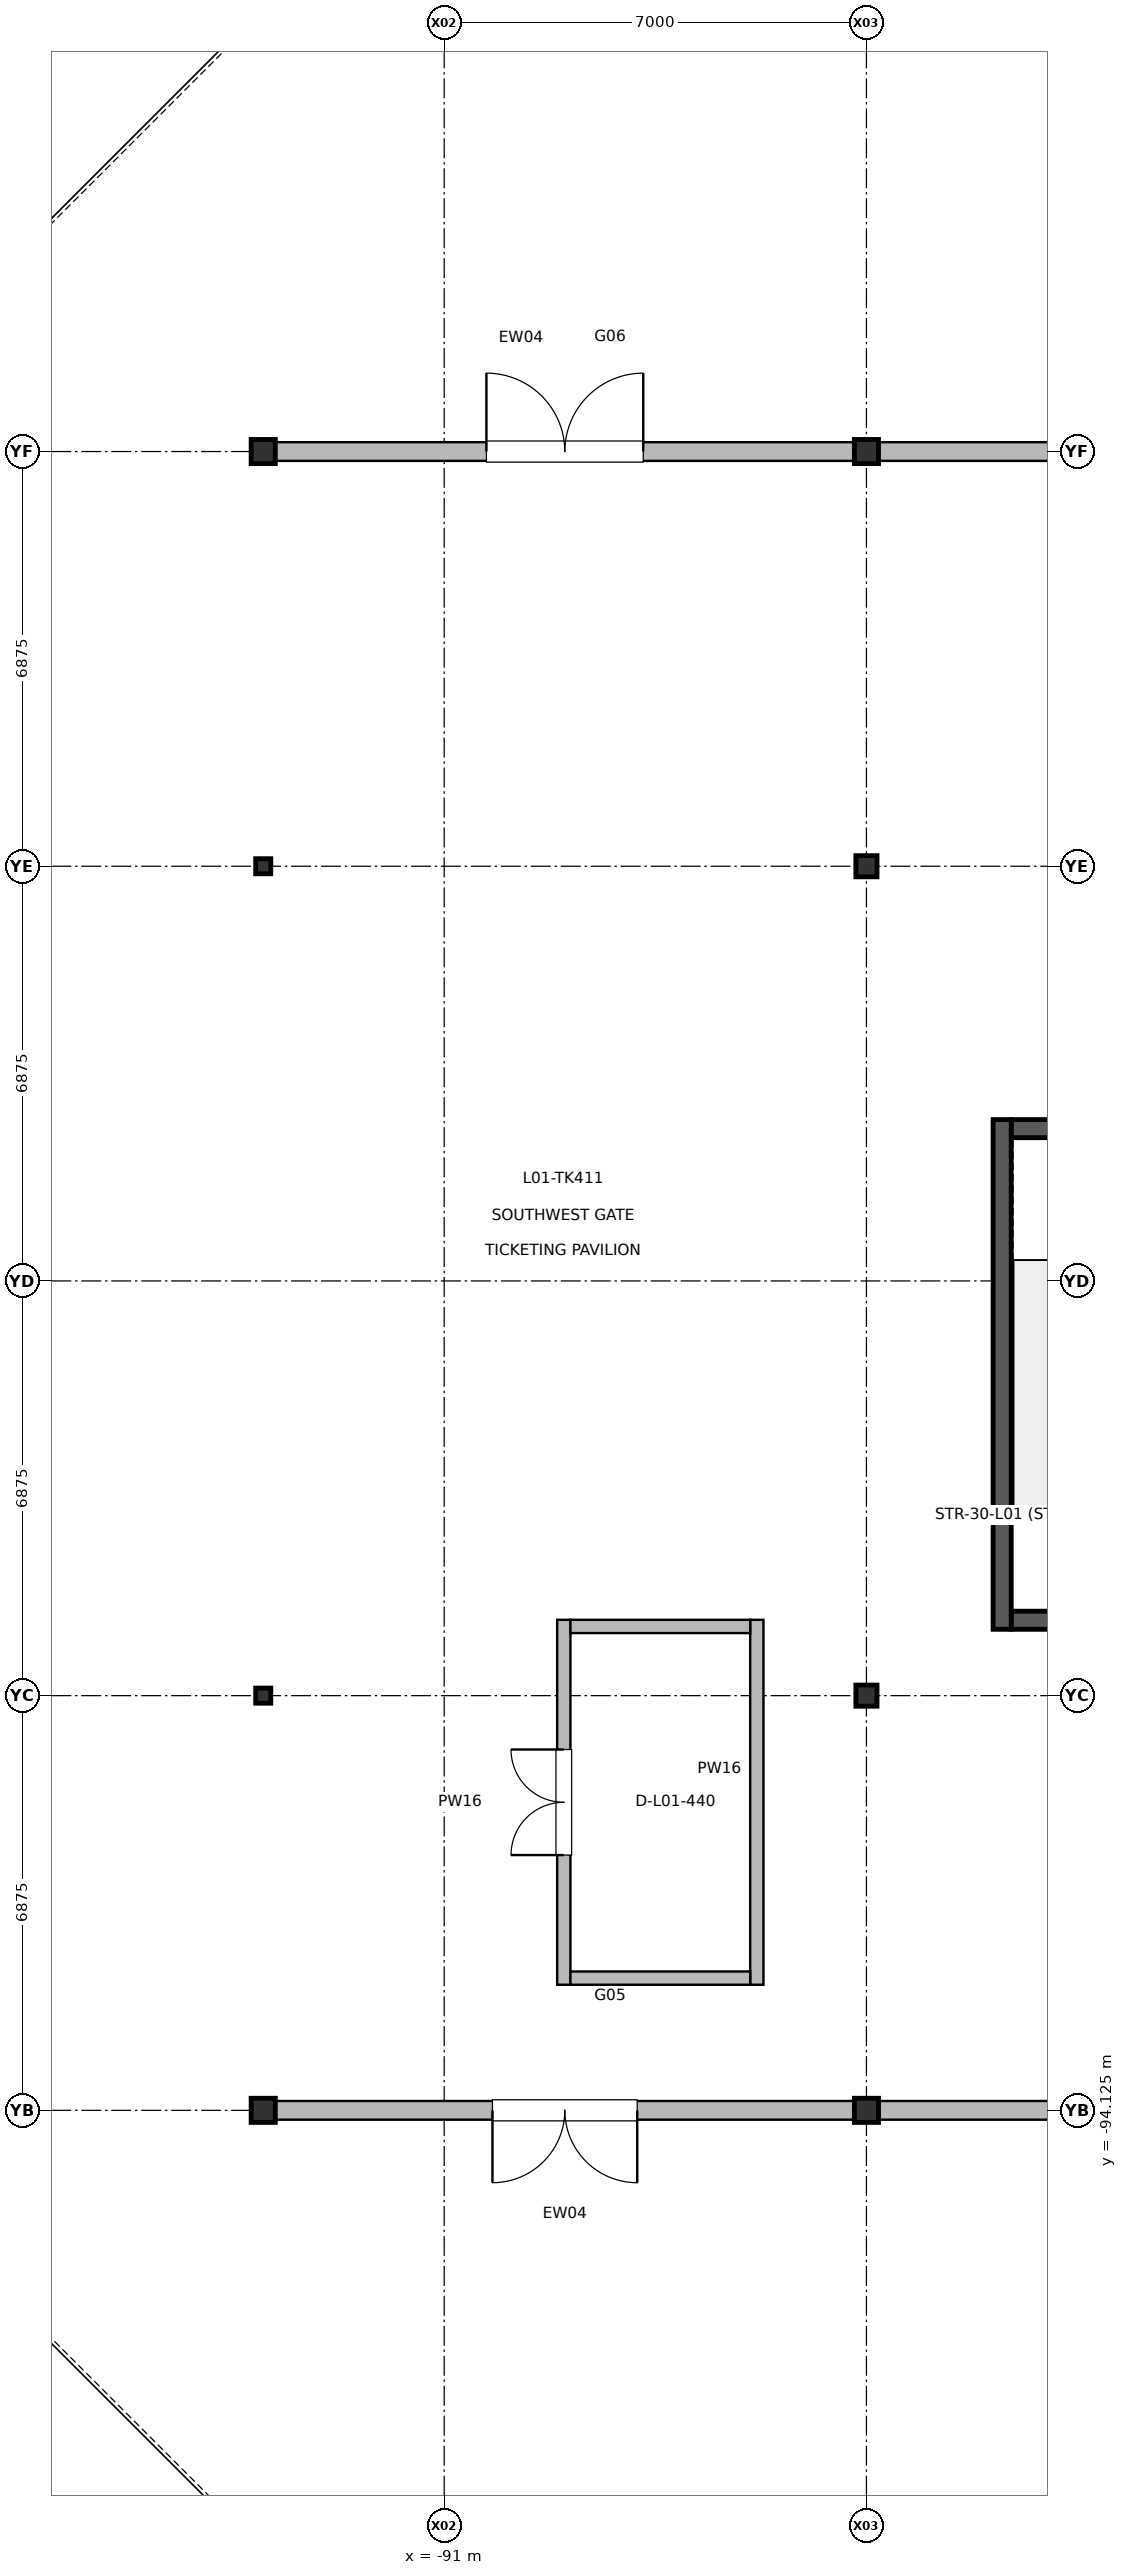
"""IFC4 building model, lengths in metres.
Left out: names, types, materials, properties, quantities, classifications, styles, units other than length and angle.
Written with IfcOpenShell. Run it as: python <this file> out.ifc"""

import sys

from ifc_helpers import new_model, si_unit, direction, frame, frame_2d, origin, origin_2d, place, context, subcontext, project, spatial, rectangle, i_section, extrude, element, fill, save


model = new_model("IFC4")
c1 = context("Model", 3, precision=1e-05, world=origin(), true_north=direction((0.0, 1.0)))
c2 = subcontext(c1, "Body", "Model", "MODEL_VIEW")
j1 = project(units=[si_unit("LENGTHUNIT", "METRE"), si_unit("PLANEANGLEUNIT", "RADIAN")], contexts=[c1])
p1 = place(None, origin())
s1 = spatial("IfcSite", under=j1, at=p1, CompositionType="ELEMENT")
p2 = place(p1, origin())
s2 = spatial("IfcBuilding", under=s1, at=p2, CompositionType="ELEMENT")
p3 = place(p2, origin())
s3 = spatial("IfcBuildingStorey", under=s2, at=p3, CompositionType="ELEMENT", Elevation=0.0)
p4 = place(p3, frame((-94.0, -94.125, 0.0), z_axis=(0.0, 0.0, 1.0), x_axis=(1.0, 0.0, 0.0)))
e1 = element("IfcColumn", 1, at=p4, inside=s3, PredefinedType="COLUMN", context=c2, shape_type="SweptSolid", body=[
    extrude(i_section(OverallWidth=0.4, OverallDepth=0.4, WebThickness=0.013, FlangeThickness=0.021, at=origin_2d()), origin(), (0.0, 0.0, 1.0), 5.998),
])
for number, where, z_axis, x_axis in (
    (2, (-94.0, -87.25, 0.0), (0.0, 0.0, 1.0), (1.0, 0.0, 0.0)),
    (3, (-94.0, -73.5, 0.0), (0.0, 0.0, 1.0), (1.0, 0.0, 0.0)),
):
    element("IfcColumn", number, at=place(p3, frame(where, z_axis=z_axis, x_axis=x_axis)), inside=s3, PredefinedType="COLUMN", context=c2, shape_type="SweptSolid", body=[
        extrude(i_section(OverallWidth=0.25, OverallDepth=0.25, WebThickness=0.009, FlangeThickness=0.014, at=origin_2d()), origin(), (0.0, 0.0, 1.0), 5.998),
    ])
for number, where, z_axis, x_axis in (
    (4, (-94.0, -66.625, 0.0), (0.0, 0.0, 1.0), (1.0, 0.0, 0.0)),
    (5, (-84.0, -94.125, 0.0), (0.0, 0.0, 1.0), (1.0, 0.0, 0.0)),
):
    element("IfcColumn", number, at=place(p3, frame(where, z_axis=z_axis, x_axis=x_axis)), inside=s3, PredefinedType="COLUMN", context=c2, shape_type="SweptSolid", body=[
        extrude(i_section(OverallWidth=0.4, OverallDepth=0.4, WebThickness=0.013, FlangeThickness=0.021, at=origin_2d()), origin(), (0.0, 0.0, 1.0), 5.998),
    ])
for number, where, z_axis, x_axis in (
    (6, (-84.0, -87.25, 0.0), (0.0, 0.0, 1.0), (1.0, 0.0, 0.0)),
    (7, (-84.0, -73.5, 0.0), (0.0, 0.0, 1.0), (1.0, 0.0, 0.0)),
):
    element("IfcColumn", number, at=place(p3, frame(where, z_axis=z_axis, x_axis=x_axis)), inside=s3, PredefinedType="COLUMN", context=c2, shape_type="SweptSolid", body=[
        extrude(i_section(OverallWidth=0.35, OverallDepth=0.35, WebThickness=0.012, FlangeThickness=0.019, at=origin_2d()), origin(), (0.0, 0.0, 1.0), 5.998),
    ])
p5 = place(p3, frame((-84.0, -66.625, 0.0), z_axis=(0.0, 0.0, 1.0), x_axis=(1.0, 0.0, 0.0)))
e8 = element("IfcColumn", 8, at=p5, inside=s3, PredefinedType="COLUMN", context=c2, shape_type="SweptSolid", body=[
    extrude(i_section(OverallWidth=0.4, OverallDepth=0.4, WebThickness=0.013, FlangeThickness=0.021, at=origin_2d()), origin(), (0.0, 0.0, 1.0), 5.998),
])
p6 = place(p3, frame((-84.19, -94.125, 0.0), z_axis=(0.0, 0.0, 1.0), x_axis=(-1.0, 0.0, 0.0)))
e9 = element("IfcWall", 9, at=p6, inside=s3, PredefinedType="SOLIDWALL", context=c2, shape_type="SweptSolid", body=[
    extrude(rectangle(XDim=9.62, YDim=0.31, at=frame_2d((4.81, 0.0))), origin(), (0.0, 0.0, 1.0), 4.675),
])
p7 = place(p6, frame((3.61, 0.0, 0.0)))
e10 = element("IfcOpeningElement", 10, at=p7, cuts=e9, PredefinedType="OPENING", context=c2, shape_type="SweptSolid", body=[
    extrude(rectangle(XDim=2.4, YDim=2.5, at=frame_2d((1.2, 1.25))), frame((0.0, 0.165, 0.0), z_axis=(0.0, -1.0, 0.0), x_axis=(1.0, 0.0, 0.0)), (0.0, 0.0, 1.0), 0.33),
])
p8 = place(p3, frame((-93.81, -66.625, 0.0), z_axis=(0.0, 0.0, 1.0), x_axis=(1.0, 0.0, 0.0)))
e11 = element("IfcWall", 11, at=p8, inside=s3, PredefinedType="SOLIDWALL", context=c2, shape_type="SweptSolid", body=[
    extrude(rectangle(XDim=9.62, YDim=0.31, at=frame_2d((4.81, 0.0))), origin(), (0.0, 0.0, 1.0), 4.575),
])
p9 = place(p8, frame((3.51, 0.0, 0.0)))
e12 = element("IfcOpeningElement", 12, at=p9, cuts=e11, PredefinedType="OPENING", context=c2, shape_type="SweptSolid", body=[
    extrude(rectangle(XDim=2.6, YDim=2.55, at=frame_2d((1.3, 1.275))), frame((0.0, 0.165, 0.0), z_axis=(0.0, -1.0, 0.0), x_axis=(1.0, 0.0, 0.0)), (0.0, 0.0, 1.0), 0.33),
])
p10 = place(p3, frame((-70.19, -94.125, 0.0), z_axis=(0.0, 0.0, 1.0), x_axis=(-1.0, 0.0, 0.0)))
e13 = element("IfcWall", 13, at=p10, inside=s3, PredefinedType="SOLIDWALL", context=c2, shape_type="SweptSolid", body=[
    extrude(rectangle(XDim=13.62, YDim=0.31, at=frame_2d((6.81, 0.0))), origin(), (0.0, 0.0, 1.0), 3.975),
])
p11 = place(p10, frame((5.61, 0.0, 0.0)))
e14 = element("IfcOpeningElement", 14, at=p11, cuts=e13, PredefinedType="OPENING", context=c2, shape_type="SweptSolid", body=[
    extrude(rectangle(XDim=2.4, YDim=2.5, at=frame_2d((1.2, 1.25))), frame((0.0, 0.165, 0.0), z_axis=(0.0, -1.0, 0.0), x_axis=(1.0, 0.0, 0.0)), (0.0, 0.0, 1.0), 0.33),
])
p12 = place(p3, frame((-83.81, -66.625, 0.0), z_axis=(0.0, 0.0, 1.0), x_axis=(1.0, 0.0, 0.0)))
e15 = element("IfcWall", 15, at=p12, inside=s3, PredefinedType="SOLIDWALL", context=c2, shape_type="SweptSolid", body=[
    extrude(rectangle(XDim=13.62, YDim=0.31, at=frame_2d((6.81, 0.0))), origin(), (0.0, 0.0, 1.0), 4.175),
])
p13 = place(p12, frame((5.51, 0.0, 0.0)))
e16 = element("IfcOpeningElement", 16, at=p13, cuts=e15, PredefinedType="OPENING", context=c2, shape_type="SweptSolid", body=[
    extrude(rectangle(XDim=2.6, YDim=2.55, at=frame_2d((1.3, 1.275))), frame((0.0, 0.165, 0.0), z_axis=(0.0, -1.0, 0.0), x_axis=(1.0, 0.0, 0.0)), (0.0, 0.0, 1.0), 0.33),
])
p14 = place(p3, frame((-89.017, -92.043, 0.0), z_axis=(0.0, 0.0, 1.0), x_axis=(0.0, 1.0, 0.0)))
e17 = element("IfcWall", 17, at=p14, inside=s3, PredefinedType="PARTITIONING", context=c2, shape_type="SweptSolid", body=[
    extrude(rectangle(XDim=6.05, YDim=0.22, at=frame_2d((3.025, 0.0))), origin(), (0.0, 0.0, 1.0), 5.02),
])
p15 = place(p14, frame((2.15, 0.0, 0.0)))
e18 = element("IfcOpeningElement", 18, at=p15, cuts=e17, PredefinedType="OPENING", context=c2, shape_type="SweptSolid", body=[
    extrude(rectangle(XDim=1.75, YDim=2.35, at=frame_2d((0.875, 1.175))), frame((0.0, 0.12, 0.0), z_axis=(0.0, -1.0, 0.0), x_axis=(1.0, 0.0, 0.0)), (0.0, 0.0, 1.0), 0.24),
])
p16 = place(p3, frame((-85.817, -92.043, 0.0), z_axis=(0.0, 0.0, 1.0), x_axis=(0.0, 1.0, 0.0)))
e19 = element("IfcWall", 19, at=p16, inside=s3, PredefinedType="PARTITIONING", context=c2, shape_type="SweptSolid", body=[
    extrude(rectangle(XDim=6.05, YDim=0.22, at=frame_2d((3.025, 0.0))), origin(), (0.0, 0.0, 1.0), 5.02),
])
for number, where, z_axis, x_axis in (
    (20, (-88.907, -91.933, 0.0), (0.0, 0.0, 1.0), (1.0, 0.0, 0.0)),
    (21, (-88.907, -86.103, 0.0), (0.0, 0.0, 1.0), (1.0, 0.0, 0.0)),
):
    element("IfcWall", number, at=place(p3, frame(where, z_axis=z_axis, x_axis=x_axis)), inside=s3, PredefinedType="PARTITIONING", context=c2, shape_type="SweptSolid", body=[
        extrude(rectangle(XDim=2.98, YDim=0.22, at=frame_2d((1.49, 0.0))), origin(), (0.0, 0.0, 1.0), 5.02),
    ])
p17 = place(p3, frame((-81.6, -86.0, 0.0), z_axis=(0.0, 0.0, 1.0), x_axis=(1.0, 0.0, 0.0)))
e22 = element("IfcWall", 22, at=p17, inside=s3, PredefinedType="SHEAR", context=c2, shape_type="SweptSolid", body=[
    extrude(rectangle(XDim=4.2, YDim=0.3, at=frame_2d((2.1, 0.0))), origin(), (0.0, 0.0, 1.0), 5.8),
])
p18 = place(p17, frame((1.375, 0.0, 0.0)))
e23 = element("IfcOpeningElement", 23, at=p18, cuts=e22, PredefinedType="OPENING", context=c2, shape_type="SweptSolid", body=[
    extrude(rectangle(XDim=1.45, YDim=2.2, at=frame_2d((0.725, 1.1))), frame((0.0, 0.16, 0.0), z_axis=(0.0, -1.0, 0.0), x_axis=(1.0, 0.0, 0.0)), (0.0, 0.0, 1.0), 0.32),
])
p19 = place(p3, frame((-81.6, -77.85, 0.0), z_axis=(0.0, 0.0, 1.0), x_axis=(1.0, 0.0, 0.0)))
e24 = element("IfcWall", 24, at=p19, inside=s3, PredefinedType="SHEAR", context=c2, shape_type="SweptSolid", body=[
    extrude(rectangle(XDim=4.2, YDim=0.3, at=frame_2d((2.1, 0.0))), origin(), (0.0, 0.0, 1.0), 5.8),
])
p20 = place(p3, frame((-81.75, -86.15, 0.0), z_axis=(0.0, 0.0, 1.0), x_axis=(0.0, 1.0, 0.0)))
e25 = element("IfcWall", 25, at=p20, inside=s3, PredefinedType="SHEAR", context=c2, shape_type="SweptSolid", body=[
    extrude(rectangle(XDim=8.45, YDim=0.3, at=frame_2d((4.225, 0.0))), origin(), (0.0, 0.0, 1.0), 5.8),
])
p21 = place(p7, origin())
e26 = element("IfcDoor", 26, at=p21, inside=s3, OperationType="DOUBLE_DOOR_SINGLE_SWING", PredefinedType="DOOR", context=c2, shape_type="SweptSolid", body=[
    extrude(rectangle(XDim=2.4, YDim=2.5, at=frame_2d((1.2, 1.25))), frame((0.0, 0.025, 0.0), z_axis=(0.0, -1.0, 0.0), x_axis=(1.0, 0.0, 0.0)), (0.0, 0.0, 1.0), 0.05),
])
fill(e10, e26)
p22 = place(p9, origin())
e27 = element("IfcDoor", 27, at=p22, inside=s3, OperationType="DOUBLE_DOOR_SINGLE_SWING", PredefinedType="DOOR", context=c2, shape_type="SweptSolid", body=[
    extrude(rectangle(XDim=2.6, YDim=2.55, at=frame_2d((1.3, 1.275))), frame((0.0, 0.025, 0.0), z_axis=(0.0, -1.0, 0.0), x_axis=(1.0, 0.0, 0.0)), (0.0, 0.0, 1.0), 0.05),
])
fill(e12, e27)
p23 = place(p15, origin())
e28 = element("IfcDoor", 28, at=p23, inside=s3, OperationType="DOUBLE_DOOR_SINGLE_SWING", PredefinedType="DOOR", context=c2, shape_type="SweptSolid", body=[
    extrude(rectangle(XDim=1.75, YDim=2.35, at=frame_2d((0.875, 1.175))), frame((0.0, 0.025, 0.0), z_axis=(0.0, -1.0, 0.0), x_axis=(1.0, 0.0, 0.0)), (0.0, 0.0, 1.0), 0.05),
])
fill(e18, e28)
save(model, sys.argv[1])
